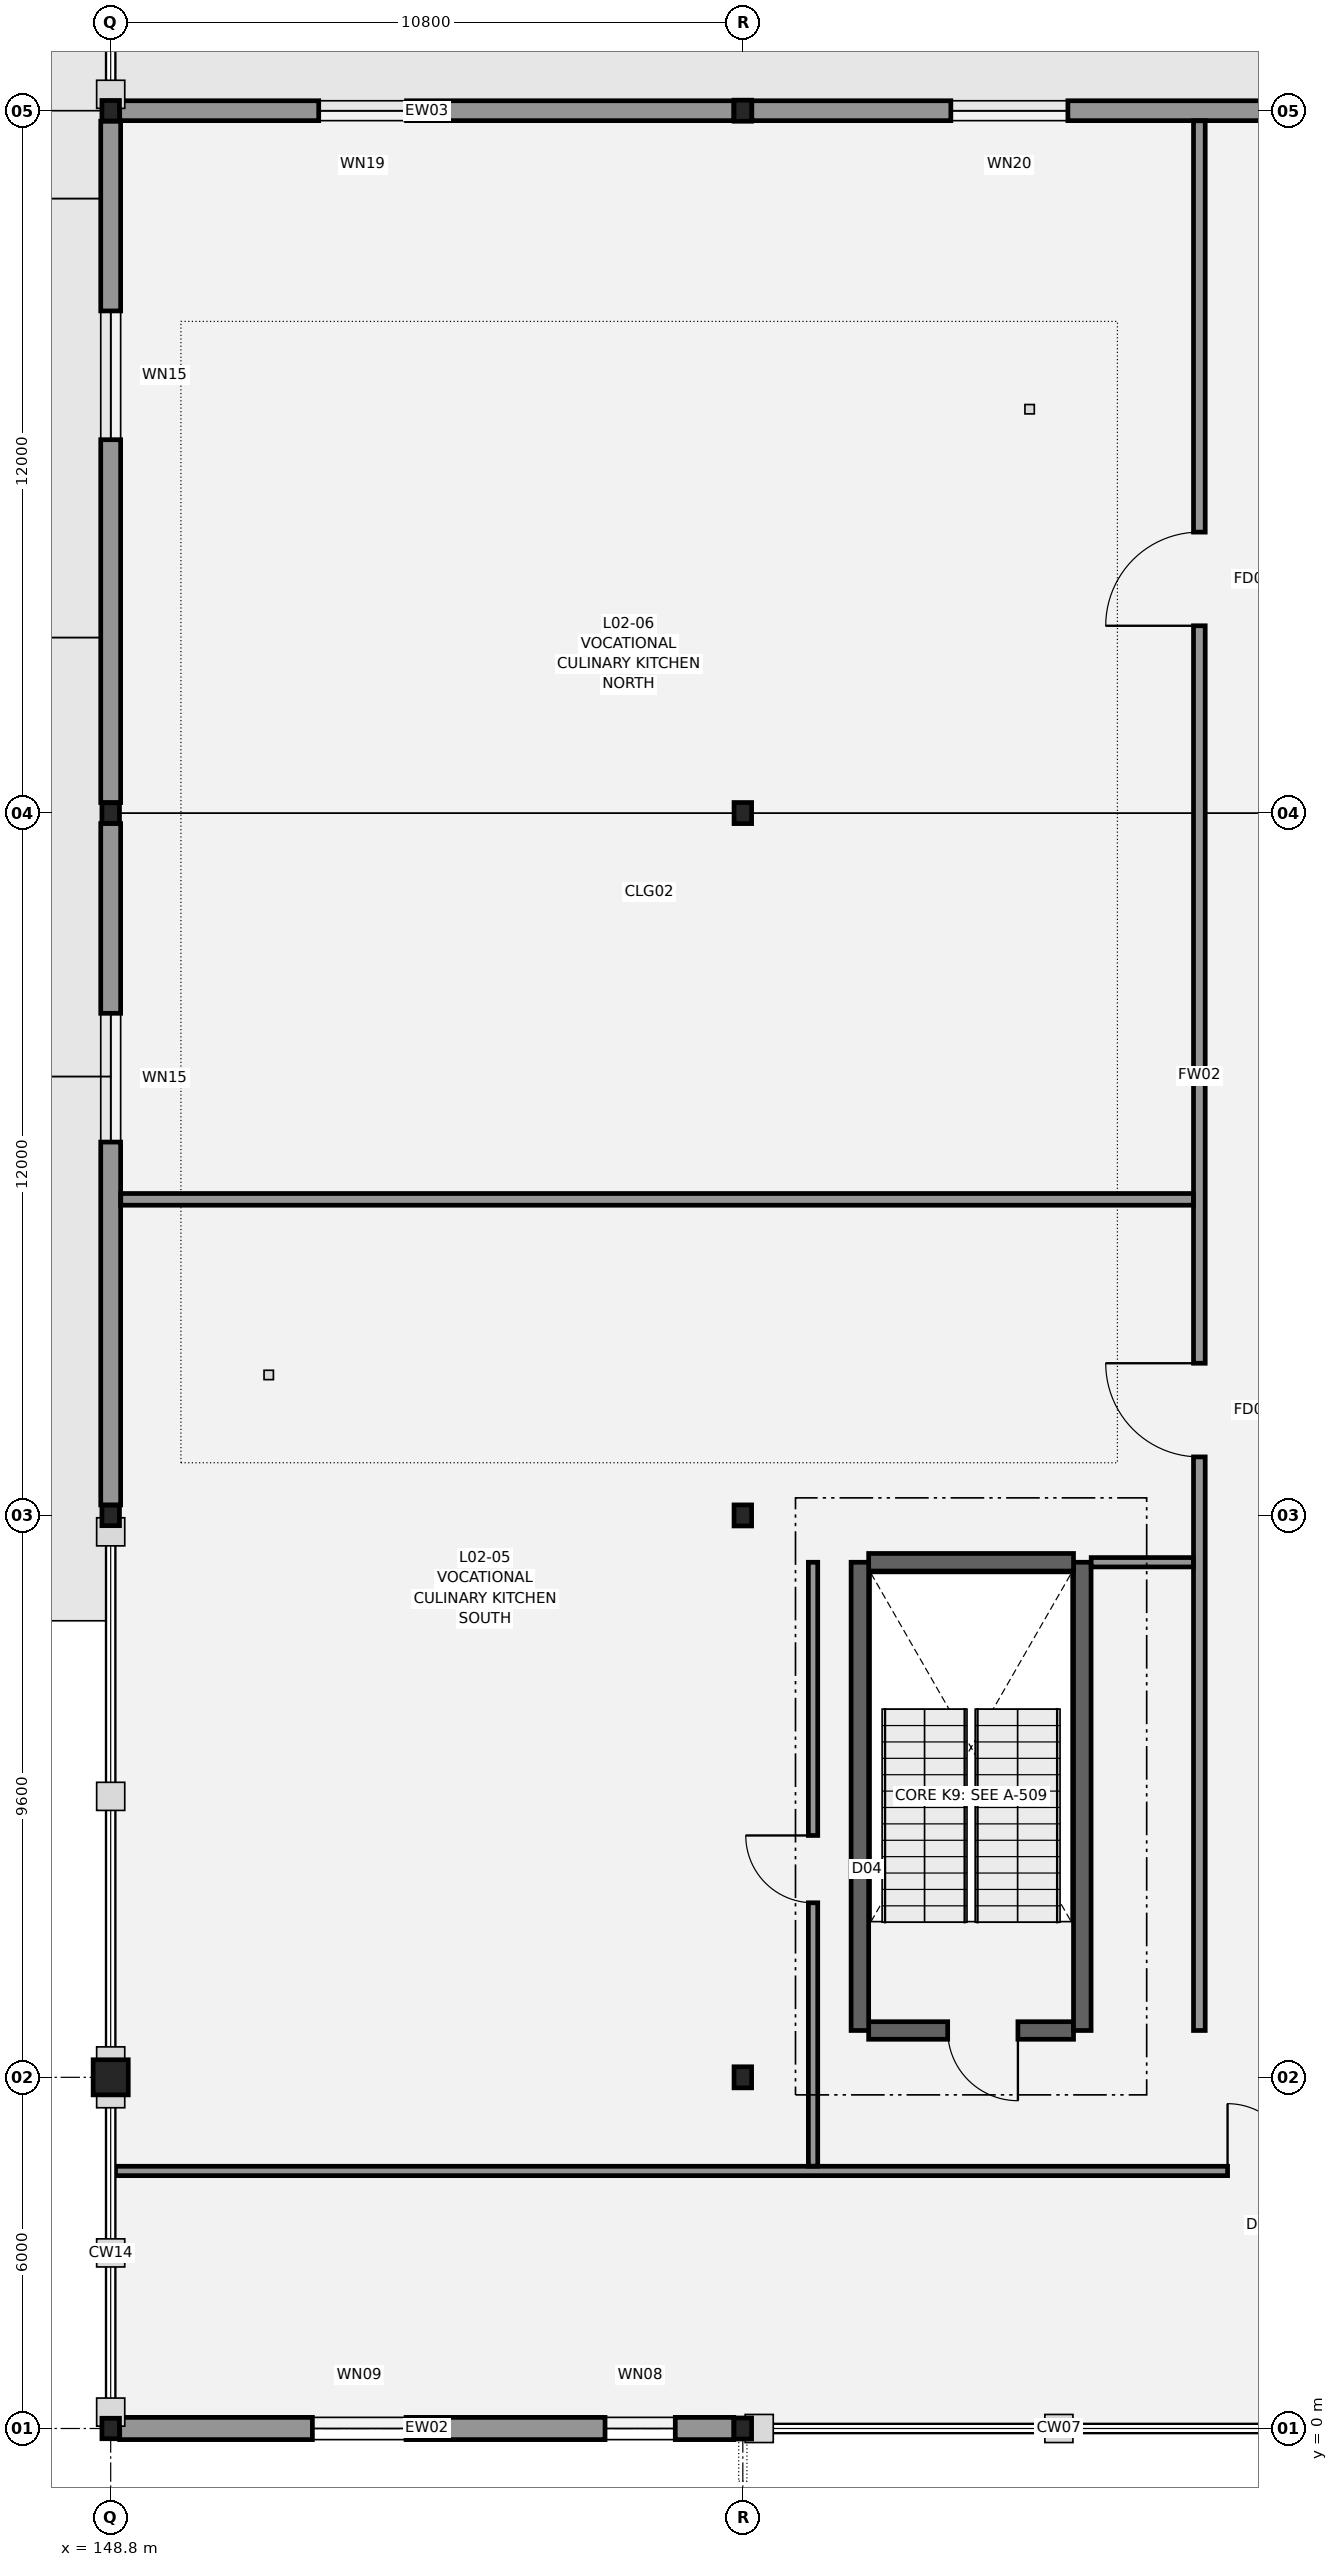
"""IFC4 building model, lengths in metres.
Left out: names, types, materials, properties, quantities, classifications, styles, units other than length and angle.
Written with IfcOpenShell. Run it as: python <this file> out.ifc"""

import sys

from ifc_helpers import new_model, si_unit, direction, frame, frame_2d, origin, origin_2d, place, context, subcontext, project, spatial, rectangle, i_section, extrude, element, fill, save


model = new_model("IFC4")
c1 = context("Model", 3, precision=1e-05, world=origin(), true_north=direction((0.0, 1.0)))
c2 = subcontext(c1, "Body", "Model", "MODEL_VIEW")
j1 = project(units=[si_unit("LENGTHUNIT", "METRE"), si_unit("PLANEANGLEUNIT", "RADIAN")], contexts=[c1])
p1 = place(None, origin())
s1 = spatial("IfcSite", under=j1, at=p1, CompositionType="ELEMENT")
p2 = place(p1, origin())
s2 = spatial("IfcBuilding", under=s1, at=p2, CompositionType="ELEMENT")
p3 = place(p2, frame((0.0, 0.0, 10.2)))
s3 = spatial("IfcBuildingStorey", under=s2, at=p3, CompositionType="ELEMENT", Elevation=10.2)
p4 = place(p3, frame((148.8, 0.0, 0.0), z_axis=(0.0, 0.0, 1.0), x_axis=(1.0, 0.0, 0.0)))
e1 = element("IfcColumn", 1, at=p4, inside=s3, PredefinedType="COLUMN", context=c2, shape_type="SweptSolid", body=[
    extrude(i_section(OverallWidth=0.3, OverallDepth=0.35, WebThickness=0.01, FlangeThickness=0.018, FilletRadius=0.027, at=origin_2d()), origin(), (0.0, 0.0, 1.0), 4.2),
])
p5 = place(p3, frame((148.8, 6.0, 0.0), z_axis=(0.0, 0.0, 1.0), x_axis=(1.0, 0.0, 0.0)))
e2 = element("IfcColumn", 2, at=p5, inside=s3, PredefinedType="COLUMN", context=c2, shape_type="SweptSolid", body=[
    extrude(rectangle(XDim=0.6, YDim=0.6, at=origin_2d()), origin(), (0.0, 0.0, 1.0), 4.2),
])
for number, where, z_axis, x_axis in (
    (3, (148.8, 15.6, 0.0), (0.0, 0.0, 1.0), (1.0, 0.0, 0.0)),
    (4, (148.8, 27.6, 0.0), (0.0, 0.0, 1.0), (1.0, 0.0, 0.0)),
    (5, (148.8, 39.6, 0.0), (0.0, 0.0, 1.0), (1.0, 0.0, 0.0)),
):
    element("IfcColumn", number, at=place(p3, frame(where, z_axis=z_axis, x_axis=x_axis)), inside=s3, PredefinedType="COLUMN", context=c2, shape_type="SweptSolid", body=[
        extrude(i_section(OverallWidth=0.3, OverallDepth=0.35, WebThickness=0.01, FlangeThickness=0.018, FilletRadius=0.027, at=origin_2d()), origin(), (0.0, 0.0, 1.0), 4.2),
    ])
for number, where, z_axis, x_axis in (
    (6, (159.6, 0.0, 0.0), (0.0, 0.0, 1.0), (1.0, 0.0, 0.0)),
    (7, (159.6, 6.0, 0.0), (0.0, 0.0, 1.0), (1.0, 0.0, 0.0)),
    (8, (159.6, 15.6, 0.0), (0.0, 0.0, 1.0), (1.0, 0.0, 0.0)),
    (9, (159.6, 27.6, 0.0), (0.0, 0.0, 1.0), (1.0, 0.0, 0.0)),
    (10, (159.6, 39.6, 0.0), (0.0, 0.0, 1.0), (1.0, 0.0, 0.0)),
):
    element("IfcColumn", number, at=place(p3, frame(where, z_axis=z_axis, x_axis=x_axis)), inside=s3, PredefinedType="COLUMN", context=c2, shape_type="SweptSolid", body=[
        extrude(i_section(OverallWidth=0.3, OverallDepth=0.36, WebThickness=0.012, FlangeThickness=0.022, FilletRadius=0.027, at=origin_2d()), origin(), (0.0, 0.0, 1.0), 4.2),
    ])
p6 = place(p3, frame((165.25, 6.8, 0.0), z_axis=(0.0, 0.0, 1.0), x_axis=(-1.0, 0.0, 0.0)))
e11 = element("IfcWall", 11, at=p6, inside=s3, PredefinedType="SHEAR", context=c2, shape_type="SweptSolid", body=[
    extrude(rectangle(XDim=3.5, YDim=0.3, at=frame_2d((1.75, 0.0))), origin(), (0.0, 0.0, 1.0), 3.89),
])
p7 = place(p6, frame((0.95, 0.0, 0.0)))
e12 = element("IfcOpeningElement", 12, at=p7, cuts=e11, PredefinedType="OPENING", context=c2, shape_type="SweptSolid", body=[
    extrude(rectangle(XDim=1.2, YDim=2.2, at=frame_2d((0.6, 1.1))), frame((0.0, 0.16, 0.0), z_axis=(0.0, -1.0, 0.0), x_axis=(1.0, 0.0, 0.0)), (0.0, 0.0, 1.0), 0.32),
])
p8 = place(p3, frame((165.4, 6.8, 0.0), z_axis=(0.0, 0.0, 1.0), x_axis=(0.0, 1.0, 0.0)))
e13 = element("IfcWall", 13, at=p8, inside=s3, PredefinedType="SHEAR", context=c2, shape_type="SweptSolid", body=[
    extrude(rectangle(XDim=8.0, YDim=0.3, at=frame_2d((4.0, 0.0))), origin(), (0.0, 0.0, 1.0), 3.89),
])
p9 = place(p3, frame((165.25, 14.8, 0.0), z_axis=(0.0, 0.0, 1.0), x_axis=(-1.0, 0.0, 0.0)))
e14 = element("IfcWall", 14, at=p9, inside=s3, PredefinedType="SHEAR", context=c2, shape_type="SweptSolid", body=[
    extrude(rectangle(XDim=3.5, YDim=0.3, at=frame_2d((1.75, 0.0))), origin(), (0.0, 0.0, 1.0), 3.89),
])
p10 = place(p3, frame((161.6, 14.8, 0.0), z_axis=(0.0, 0.0, 1.0), x_axis=(0.0, -1.0, 0.0)))
e15 = element("IfcWall", 15, at=p10, inside=s3, PredefinedType="SHEAR", context=c2, shape_type="SweptSolid", body=[
    extrude(rectangle(XDim=8.0, YDim=0.3, at=frame_2d((4.0, 0.0))), origin(), (0.0, 0.0, 1.0), 3.89),
])
p11 = place(p3, frame((159.446, 0.0, 0.0), z_axis=(0.0, 0.0, 1.0), x_axis=(-1.0, 0.0, 0.0)))
e16 = element("IfcWall", 16, at=p11, inside=s3, PredefinedType="STANDARD", context=c2, shape_type="SweptSolid", body=[
    extrude(rectangle(XDim=10.492, YDim=0.38, at=frame_2d((5.246, 0.0))), origin(), (0.0, 0.0, 1.0), 3.625),
])
p12 = place(p11, frame((1.0, 0.0, 0.8)))
e17 = element("IfcOpeningElement", 17, at=p12, cuts=e16, PredefinedType="OPENING", context=c2, shape_type="SweptSolid", body=[
    extrude(rectangle(XDim=1.2, YDim=2.0, at=frame_2d((0.6, 1.0))), frame((0.0, 0.2, 0.0), z_axis=(0.0, -1.0, 0.0), x_axis=(1.0, 0.0, 0.0)), (0.0, 0.0, 1.0), 0.4),
])
p13 = place(p11, frame((5.6, 0.0, 0.8)))
e18 = element("IfcOpeningElement", 18, at=p13, cuts=e16, PredefinedType="OPENING", context=c2, shape_type="SweptSolid", body=[
    extrude(rectangle(XDim=1.6, YDim=2.0, at=frame_2d((0.8, 1.0))), frame((0.0, 0.2, 0.0), z_axis=(0.0, -1.0, 0.0), x_axis=(1.0, 0.0, 0.0)), (0.0, 0.0, 1.0), 0.4),
])
p14 = place(p3, frame((148.954, 39.6, 0.0), z_axis=(0.0, 0.0, 1.0), x_axis=(1.0, 0.0, 0.0)))
e19 = element("IfcWall", 19, at=p14, inside=s3, PredefinedType="STANDARD", context=c2, shape_type="SweptSolid", body=[
    extrude(rectangle(XDim=10.492, YDim=0.34, at=frame_2d((5.246, 0.0))), origin(), (0.0, 0.0, 1.0), 3.625),
])
p15 = place(p14, frame((3.4, 0.0, 0.8)))
e20 = element("IfcOpeningElement", 20, at=p15, cuts=e19, PredefinedType="OPENING", context=c2, shape_type="SweptSolid", body=[
    extrude(rectangle(XDim=1.5, YDim=1.6, at=frame_2d((0.75, 0.8))), frame((0.0, 0.18, 0.0), z_axis=(0.0, -1.0, 0.0), x_axis=(1.0, 0.0, 0.0)), (0.0, 0.0, 1.0), 0.36),
])
p16 = place(p3, frame((159.754, 39.6, 0.0), z_axis=(0.0, 0.0, 1.0), x_axis=(1.0, 0.0, 0.0)))
e21 = element("IfcWall", 21, at=p16, inside=s3, PredefinedType="STANDARD", context=c2, shape_type="SweptSolid", body=[
    extrude(rectangle(XDim=10.492, YDim=0.34, at=frame_2d((5.246, 0.0))), origin(), (0.0, 0.0, 1.0), 3.445),
])
p17 = place(p16, frame((3.4, 0.0, 0.8)))
e22 = element("IfcOpeningElement", 22, at=p17, cuts=e21, PredefinedType="OPENING", context=c2, shape_type="SweptSolid", body=[
    extrude(rectangle(XDim=2.0, YDim=1.6, at=frame_2d((1.0, 0.8))), frame((0.0, 0.18, 0.0), z_axis=(0.0, -1.0, 0.0), x_axis=(1.0, 0.0, 0.0)), (0.0, 0.0, 1.0), 0.36),
])
p18 = place(p3, frame((148.8, 15.779, 0.0), z_axis=(0.0, 0.0, 1.0), x_axis=(0.0, 1.0, 0.0)))
e23 = element("IfcWall", 23, at=p18, inside=s3, PredefinedType="STANDARD", context=c2, shape_type="SweptSolid", body=[
    extrude(rectangle(XDim=11.642, YDim=0.34, at=frame_2d((5.821, 0.0))), origin(), (0.0, 0.0, 1.0), 3.625),
])
p19 = place(p18, frame((6.2, 0.0, 2.18)))
e24 = element("IfcOpeningElement", 24, at=p19, cuts=e23, PredefinedType="OPENING", context=c2, shape_type="SweptSolid", body=[
    extrude(rectangle(XDim=2.2, YDim=1.4, at=frame_2d((1.1, 0.7))), frame((0.0, 0.18, 0.0), z_axis=(0.0, -1.0, 0.0), x_axis=(1.0, 0.0, 0.0)), (0.0, 0.0, 1.0), 0.36),
])
p20 = place(p3, frame((148.8, 27.779, 0.0), z_axis=(0.0, 0.0, 1.0), x_axis=(0.0, 1.0, 0.0)))
e25 = element("IfcWall", 25, at=p20, inside=s3, PredefinedType="STANDARD", context=c2, shape_type="SweptSolid", body=[
    extrude(rectangle(XDim=11.642, YDim=0.34, at=frame_2d((5.821, 0.0))), origin(), (0.0, 0.0, 1.0), 3.625),
])
p21 = place(p20, frame((6.2, 0.0, 2.18)))
e26 = element("IfcOpeningElement", 26, at=p21, cuts=e25, PredefinedType="OPENING", context=c2, shape_type="SweptSolid", body=[
    extrude(rectangle(XDim=2.2, YDim=1.4, at=frame_2d((1.1, 0.7))), frame((0.0, 0.18, 0.0), z_axis=(0.0, -1.0, 0.0), x_axis=(1.0, 0.0, 0.0)), (0.0, 0.0, 1.0), 0.36),
])
p22 = place(p3, frame((148.882, 4.4, 0.0), z_axis=(0.0, 0.0, 1.0), x_axis=(1.0, 0.0, 0.0)))
e27 = element("IfcWall", 27, at=p22, inside=s3, PredefinedType="PARTITIONING", context=c2, shape_type="SweptSolid", body=[
    extrude(rectangle(XDim=42.926, YDim=0.16, at=frame_2d((21.463, 0.0))), origin(), (0.0, 0.0, 1.0), 3.58),
])
p23 = place(p22, frame((19.0, 0.0, 0.0)))
e28 = element("IfcOpeningElement", 28, at=p23, cuts=e27, PredefinedType="OPENING", context=c2, shape_type="SweptSolid", body=[
    extrude(rectangle(XDim=1.15, YDim=2.15, at=frame_2d((0.575, 1.075))), frame((0.0, 0.09, 0.0), z_axis=(0.0, -1.0, 0.0), x_axis=(1.0, 0.0, 0.0)), (0.0, 0.0, 1.0), 0.18),
])
p24 = place(p3, frame((167.4, 6.8, 0.0), z_axis=(0.0, 0.0, 1.0), x_axis=(0.0, 1.0, 0.0)))
e29 = element("IfcWall", 29, at=p24, inside=s3, PredefinedType="PARTITIONING", context=c2, shape_type="SweptSolid", body=[
    extrude(rectangle(XDim=32.628, YDim=0.2, at=frame_2d((16.314, 0.0))), origin(), (0.0, 0.0, 1.0), 3.58),
])
p25 = place(p24, frame((9.8, 0.0, 0.0)))
e30 = element("IfcOpeningElement", 30, at=p25, cuts=e29, PredefinedType="OPENING", context=c2, shape_type="SweptSolid", body=[
    extrude(rectangle(XDim=1.6, YDim=2.2, at=frame_2d((0.8, 1.1))), frame((0.0, 0.11, 0.0), z_axis=(0.0, -1.0, 0.0), x_axis=(1.0, 0.0, 0.0)), (0.0, 0.0, 1.0), 0.22),
])
p26 = place(p24, frame((24.0, 0.0, 0.0)))
e31 = element("IfcOpeningElement", 31, at=p26, cuts=e29, PredefinedType="OPENING", context=c2, shape_type="SweptSolid", body=[
    extrude(rectangle(XDim=1.6, YDim=2.2, at=frame_2d((0.8, 1.1))), frame((0.0, 0.11, 0.0), z_axis=(0.0, -1.0, 0.0), x_axis=(1.0, 0.0, 0.0)), (0.0, 0.0, 1.0), 0.22),
])
p27 = place(p3, frame((160.8, 4.482, 0.0), z_axis=(0.0, 0.0, 1.0), x_axis=(0.0, 1.0, 0.0)))
e32 = element("IfcWall", 32, at=p27, inside=s3, PredefinedType="PARTITIONING", context=c2, shape_type="SweptSolid", body=[
    extrude(rectangle(XDim=10.318, YDim=0.16, at=frame_2d((5.159, 0.0))), origin(), (0.0, 0.0, 1.0), 3.58),
])
p28 = place(p27, frame((4.5, 0.0, 0.0)))
e33 = element("IfcOpeningElement", 33, at=p28, cuts=e32, PredefinedType="OPENING", context=c2, shape_type="SweptSolid", body=[
    extrude(rectangle(XDim=1.15, YDim=2.15, at=frame_2d((0.575, 1.075))), frame((0.0, 0.09, 0.0), z_axis=(0.0, -1.0, 0.0), x_axis=(1.0, 0.0, 0.0)), (0.0, 0.0, 1.0), 0.18),
])
p29 = place(p3, frame((165.552, 14.8, 0.0), z_axis=(0.0, 0.0, 1.0), x_axis=(1.0, 0.0, 0.0)))
e34 = element("IfcWall", 34, at=p29, inside=s3, PredefinedType="PARTITIONING", context=c2, shape_type="SweptSolid", body=[
    extrude(rectangle(XDim=1.746, YDim=0.16, at=frame_2d((0.873, 0.0))), origin(), (0.0, 0.0, 1.0), 3.58),
])
p30 = place(p3, frame((148.972, 21.0, 0.0), z_axis=(0.0, 0.0, 1.0), x_axis=(1.0, 0.0, 0.0)))
e35 = element("IfcWall", 35, at=p30, inside=s3, PredefinedType="PARTITIONING", context=c2, shape_type="SweptSolid", body=[
    extrude(rectangle(XDim=18.326, YDim=0.2, at=frame_2d((9.163, 0.0))), origin(), (0.0, 0.0, 1.0), 3.58),
])
p31 = place(p12, origin())
e36 = element("IfcWindow", 36, at=p31, inside=s3, PartitioningType="SINGLE_PANEL", PredefinedType="WINDOW", context=c2, shape_type="SweptSolid", body=[
    extrude(rectangle(XDim=1.2, YDim=2.0, at=frame_2d((0.6, 1.0))), frame((0.0, 0.03, 0.0), z_axis=(0.0, -1.0, 0.0), x_axis=(1.0, 0.0, 0.0)), (0.0, 0.0, 1.0), 0.06),
])
fill(e17, e36)
p32 = place(p13, origin())
e37 = element("IfcWindow", 37, at=p32, inside=s3, PartitioningType="SINGLE_PANEL", PredefinedType="WINDOW", context=c2, shape_type="SweptSolid", body=[
    extrude(rectangle(XDim=1.6, YDim=2.0, at=frame_2d((0.8, 1.0))), frame((0.0, 0.03, 0.0), z_axis=(0.0, -1.0, 0.0), x_axis=(1.0, 0.0, 0.0)), (0.0, 0.0, 1.0), 0.06),
])
fill(e18, e37)
p33 = place(p15, origin())
e38 = element("IfcWindow", 38, at=p33, inside=s3, PartitioningType="SINGLE_PANEL", PredefinedType="WINDOW", context=c2, shape_type="SweptSolid", body=[
    extrude(rectangle(XDim=1.5, YDim=1.6, at=frame_2d((0.75, 0.8))), frame((0.0, 0.03, 0.0), z_axis=(0.0, -1.0, 0.0), x_axis=(1.0, 0.0, 0.0)), (0.0, 0.0, 1.0), 0.06),
])
fill(e20, e38)
p34 = place(p17, origin())
e39 = element("IfcWindow", 39, at=p34, inside=s3, PartitioningType="SINGLE_PANEL", PredefinedType="WINDOW", context=c2, shape_type="SweptSolid", body=[
    extrude(rectangle(XDim=2.0, YDim=1.6, at=frame_2d((1.0, 0.8))), frame((0.0, 0.03, 0.0), z_axis=(0.0, -1.0, 0.0), x_axis=(1.0, 0.0, 0.0)), (0.0, 0.0, 1.0), 0.06),
])
fill(e22, e39)
p35 = place(p19, origin())
e40 = element("IfcWindow", 40, at=p35, inside=s3, PartitioningType="SINGLE_PANEL", PredefinedType="WINDOW", context=c2, shape_type="SweptSolid", body=[
    extrude(rectangle(XDim=2.2, YDim=1.4, at=frame_2d((1.1, 0.7))), frame((0.0, 0.03, 0.0), z_axis=(0.0, -1.0, 0.0), x_axis=(1.0, 0.0, 0.0)), (0.0, 0.0, 1.0), 0.06),
])
fill(e24, e40)
p36 = place(p21, origin())
e41 = element("IfcWindow", 41, at=p36, inside=s3, PartitioningType="SINGLE_PANEL", PredefinedType="WINDOW", context=c2, shape_type="SweptSolid", body=[
    extrude(rectangle(XDim=2.2, YDim=1.4, at=frame_2d((1.1, 0.7))), frame((0.0, 0.03, 0.0), z_axis=(0.0, -1.0, 0.0), x_axis=(1.0, 0.0, 0.0)), (0.0, 0.0, 1.0), 0.06),
])
fill(e26, e41)
p37 = place(p23, origin())
e42 = element("IfcDoor", 42, at=p37, inside=s3, OperationType="SINGLE_SWING_LEFT", PredefinedType="DOOR", context=c2, shape_type="SweptSolid", body=[
    extrude(rectangle(XDim=1.15, YDim=2.15, at=frame_2d((0.575, 1.075))), frame((0.0, 0.025, 0.0), z_axis=(0.0, -1.0, 0.0), x_axis=(1.0, 0.0, 0.0)), (0.0, 0.0, 1.0), 0.05),
])
fill(e28, e42)
p38 = place(p25, origin())
e43 = element("IfcDoor", 43, at=p38, inside=s3, OperationType="SINGLE_SWING_RIGHT", PredefinedType="DOOR", context=c2, shape_type="SweptSolid", body=[
    extrude(rectangle(XDim=1.6, YDim=2.2, at=frame_2d((0.8, 1.1))), frame((0.0, 0.025, 0.0), z_axis=(0.0, -1.0, 0.0), x_axis=(1.0, 0.0, 0.0)), (0.0, 0.0, 1.0), 0.05),
])
fill(e30, e43)
p39 = place(p26, origin())
e44 = element("IfcDoor", 44, at=p39, inside=s3, OperationType="SINGLE_SWING_LEFT", PredefinedType="DOOR", context=c2, shape_type="SweptSolid", body=[
    extrude(rectangle(XDim=1.6, YDim=2.2, at=frame_2d((0.8, 1.1))), frame((0.0, 0.025, 0.0), z_axis=(0.0, -1.0, 0.0), x_axis=(1.0, 0.0, 0.0)), (0.0, 0.0, 1.0), 0.05),
])
fill(e31, e44)
p40 = place(p28, origin())
e45 = element("IfcDoor", 45, at=p40, inside=s3, OperationType="SINGLE_SWING_RIGHT", PredefinedType="DOOR", context=c2, shape_type="SweptSolid", body=[
    extrude(rectangle(XDim=1.15, YDim=2.15, at=frame_2d((0.575, 1.075))), frame((0.0, 0.025, 0.0), z_axis=(0.0, -1.0, 0.0), x_axis=(1.0, 0.0, 0.0)), (0.0, 0.0, 1.0), 0.05),
])
fill(e33, e45)
p41 = place(p7, origin())
e46 = element("IfcDoor", 46, at=p41, inside=s3, OperationType="SINGLE_SWING_LEFT", PredefinedType="DOOR", context=c2, shape_type="SweptSolid", body=[
    extrude(rectangle(XDim=1.2, YDim=2.2, at=frame_2d((0.6, 1.1))), frame((0.0, 0.025, 0.0), z_axis=(0.0, -1.0, 0.0), x_axis=(1.0, 0.0, 0.0)), (0.0, 0.0, 1.0), 0.05),
])
fill(e12, e46)
save(model, sys.argv[1])
